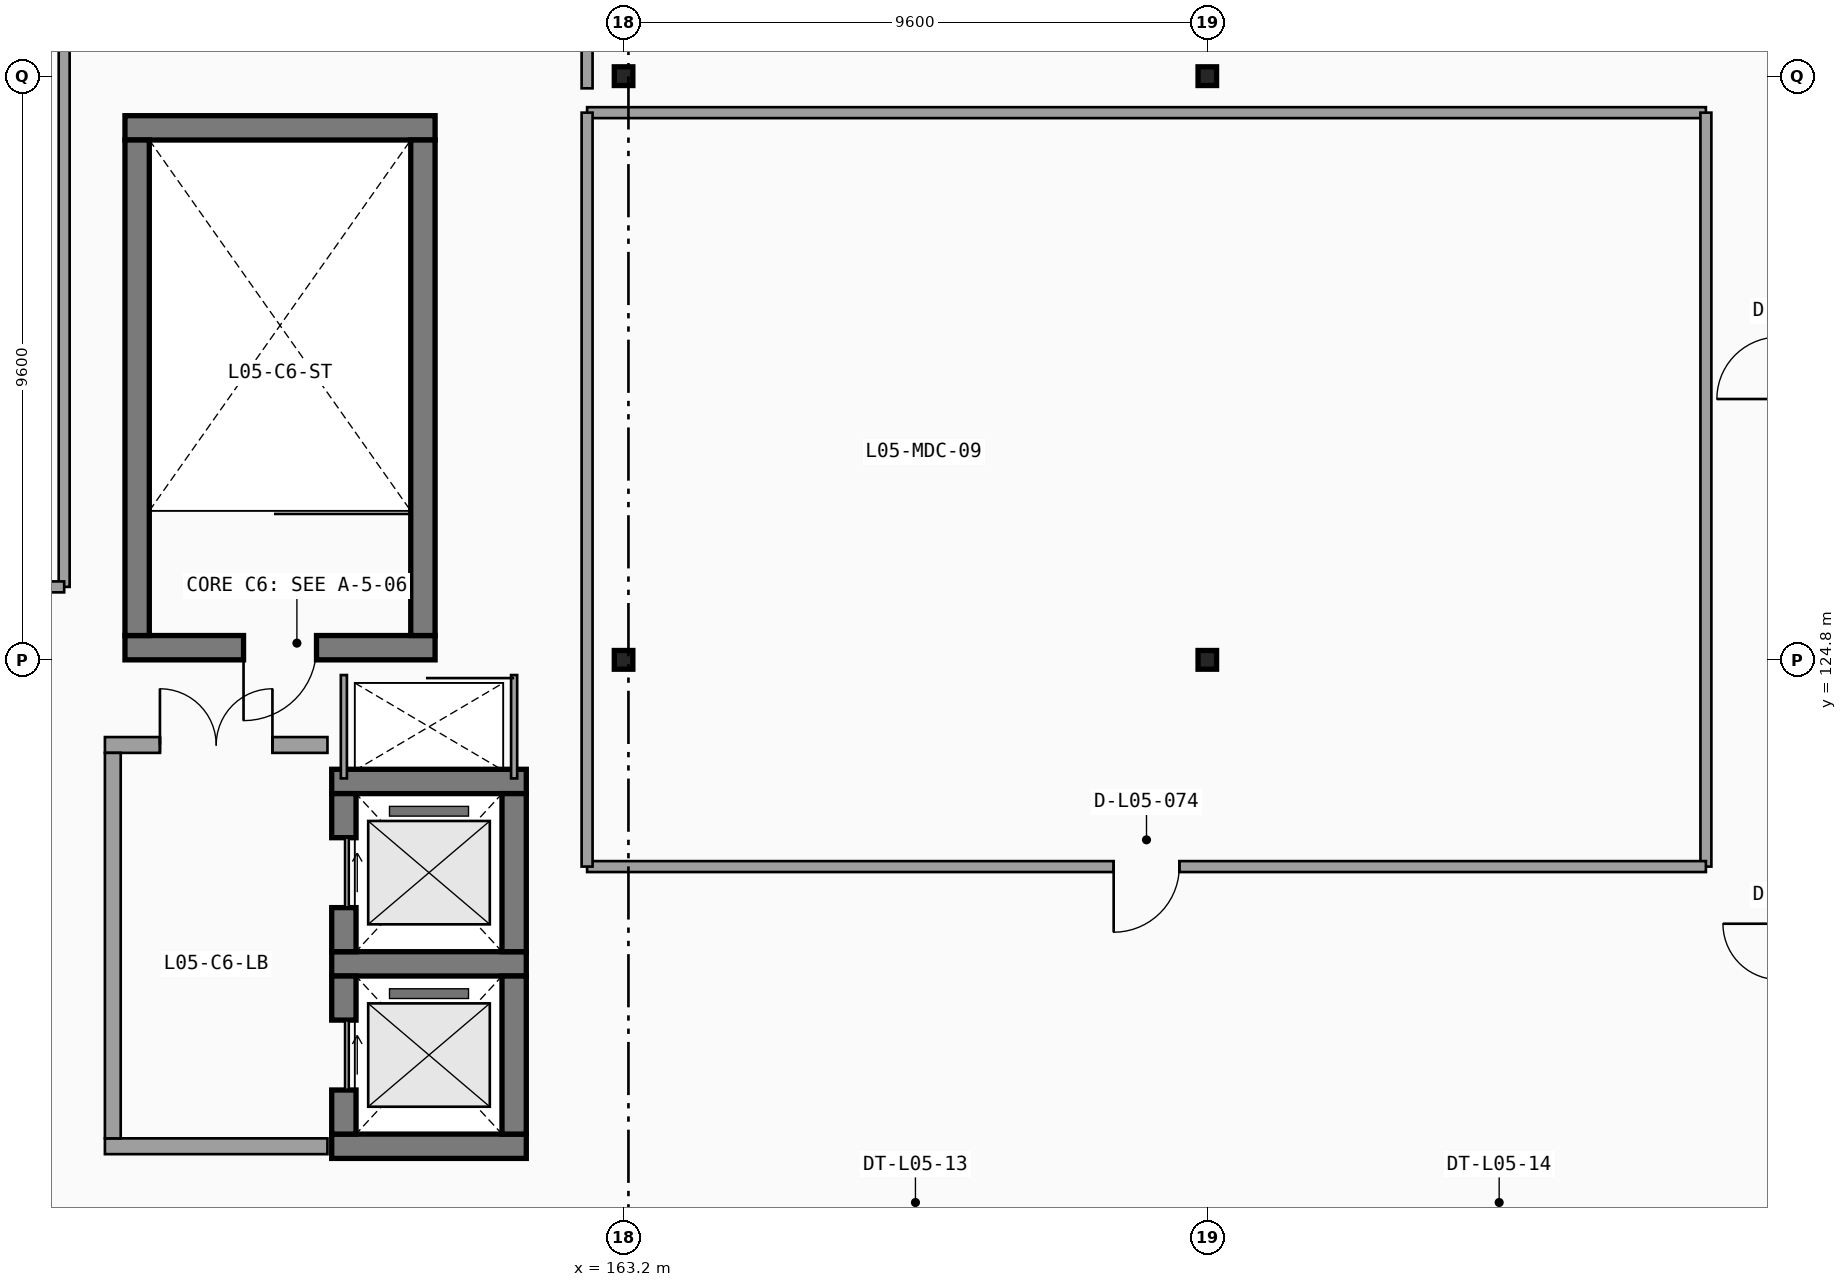
"""IFC4 building model, lengths in metres.
Left out: names, types, materials, properties, quantities, classifications, styles, units other than length and angle.
Written with IfcOpenShell. Run it as: python <this file> out.ifc"""

import sys

from ifc_helpers import new_model, si_unit, direction, frame, frame_2d, origin, origin_2d, place, context, subcontext, project, spatial, rectangle, i_section, extrude, element, fill, save


model = new_model("IFC4")
c1 = context("Model", 3, precision=1e-05, world=origin(), true_north=direction((0.0, 1.0)))
c2 = subcontext(c1, "Body", "Model", "MODEL_VIEW")
j1 = project(units=[si_unit("LENGTHUNIT", "METRE"), si_unit("PLANEANGLEUNIT", "RADIAN")], contexts=[c1])
p1 = place(None, origin())
s1 = spatial("IfcSite", under=j1, at=p1, CompositionType="ELEMENT")
p2 = place(p1, origin())
s2 = spatial("IfcBuilding", under=s1, at=p2, CompositionType="ELEMENT")
p3 = place(p2, frame((0.0, 0.0, 23.1)))
s3 = spatial("IfcBuildingStorey", under=s2, at=p3, CompositionType="ELEMENT", Elevation=23.1)
for number, where, z_axis, x_axis in (
    (1, (163.2, 124.8, 0.0), (0.0, 0.0, 1.0), (1.0, 0.0, 0.0)),
    (2, (163.2, 134.4, 0.0), (0.0, 0.0, 1.0), (1.0, 0.0, 0.0)),
    (3, (172.8, 124.8, 0.0), (0.0, 0.0, 1.0), (1.0, 0.0, 0.0)),
    (4, (172.8, 134.4, 0.0), (0.0, 0.0, 1.0), (1.0, 0.0, 0.0)),
):
    element("IfcColumn", number, at=place(p3, frame(where, z_axis=z_axis, x_axis=x_axis)), inside=s3, PredefinedType="COLUMN", context=c2, shape_type="SweptSolid", body=[
        extrude(i_section(OverallWidth=0.305, OverallDepth=0.308, WebThickness=0.01, FlangeThickness=0.015, FilletRadius=0.013, at=origin_2d()), origin(), (0.0, 0.0, 1.0), 5.1),
    ])
p4 = place(p3, frame((155.0, 125.0, 0.0), z_axis=(0.0, 0.0, 1.0), x_axis=(1.0, 0.0, 0.0)))
e5 = element("IfcWall", 5, at=p4, inside=s3, PredefinedType="SHEAR", context=c2, shape_type="SweptSolid", body=[
    extrude(rectangle(XDim=5.1, YDim=0.4, at=frame_2d((2.55, 0.0))), origin(), (0.0, 0.0, 1.0), 4.82),
])
p5 = place(p4, frame((3.15, 0.0, 0.0), z_axis=(0.0, 0.0, 1.0), x_axis=(-1.0, 0.0, 0.0)))
e6 = element("IfcOpeningElement", 6, at=p5, cuts=e5, PredefinedType="OPENING", context=c2, shape_type="SweptSolid", body=[
    extrude(rectangle(XDim=1.2, YDim=2.2, at=frame_2d((0.6, 1.1))), frame((0.0, 0.21, 0.0), z_axis=(0.0, -1.0, 0.0), x_axis=(1.0, 0.0, 0.0)), (0.0, 0.0, 1.0), 0.42),
])
p6 = place(p3, frame((160.1, 133.55, 0.0), z_axis=(0.0, 0.0, 1.0), x_axis=(-1.0, 0.0, 0.0)))
e7 = element("IfcWall", 7, at=p6, inside=s3, PredefinedType="SHEAR", context=c2, shape_type="SweptSolid", body=[
    extrude(rectangle(XDim=5.1, YDim=0.4, at=frame_2d((2.55, 0.0))), origin(), (0.0, 0.0, 1.0), 4.82),
])
for number, where, z_axis, x_axis in (
    (8, (155.2, 133.35, 0.0), (0.0, 0.0, 1.0), (0.0, -1.0, 0.0)),
    (9, (159.9, 125.2, 0.0), (0.0, 0.0, 1.0), (0.0, 1.0, 0.0)),
):
    element("IfcWall", number, at=place(p3, frame(where, z_axis=z_axis, x_axis=x_axis)), inside=s3, PredefinedType="SHEAR", context=c2, shape_type="SweptSolid", body=[
        extrude(rectangle(XDim=8.15, YDim=0.4, at=frame_2d((4.075, 0.0))), origin(), (0.0, 0.0, 1.0), 4.82),
    ])
for number, where, z_axis, x_axis in (
    (10, (158.4, 116.8, 0.0), (0.0, 0.0, 1.0), (1.0, 0.0, 0.0)),
    (11, (161.6, 119.8, 0.0), (0.0, 0.0, 1.0), (-1.0, 0.0, 0.0)),
):
    element("IfcWall", number, at=place(p3, frame(where, z_axis=z_axis, x_axis=x_axis)), inside=s3, PredefinedType="SHEAR", context=c2, shape_type="SweptSolid", body=[
        extrude(rectangle(XDim=3.2, YDim=0.4, at=frame_2d((1.6, 0.0))), origin(), (0.0, 0.0, 1.0), 4.82),
    ])
p7 = place(p3, frame((158.6, 119.6, 0.0), z_axis=(0.0, 0.0, 1.0), x_axis=(0.0, -1.0, 0.0)))
e12 = element("IfcWall", 12, at=p7, inside=s3, PredefinedType="SHEAR", context=c2, shape_type="SweptSolid", body=[
    extrude(rectangle(XDim=2.6, YDim=0.4, at=frame_2d((1.3, 0.0))), origin(), (0.0, 0.0, 1.0), 4.82),
])
p8 = place(p7, frame((0.725, 0.0, 0.0), z_axis=(0.0, 0.0, 1.0), x_axis=(1.0, 0.0, 0.0)))
e13 = element("IfcOpeningElement", 13, at=p8, cuts=e12, PredefinedType="OPENING", context=c2, shape_type="SweptSolid", body=[
    extrude(rectangle(XDim=1.15, YDim=2.2, at=frame_2d((0.575, 1.1))), frame((0.0, 0.21, 0.0), z_axis=(0.0, -1.0, 0.0), x_axis=(1.0, 0.0, 0.0)), (0.0, 0.0, 1.0), 0.42),
])
p9 = place(p3, frame((161.4, 117.0, 0.0), z_axis=(0.0, 0.0, 1.0), x_axis=(0.0, 1.0, 0.0)))
e14 = element("IfcWall", 14, at=p9, inside=s3, PredefinedType="SHEAR", context=c2, shape_type="SweptSolid", body=[
    extrude(rectangle(XDim=2.6, YDim=0.4, at=frame_2d((1.3, 0.0))), origin(), (0.0, 0.0, 1.0), 4.82),
])
p10 = place(p3, frame((161.6, 122.8, 0.0), z_axis=(0.0, 0.0, 1.0), x_axis=(-1.0, 0.0, 0.0)))
e15 = element("IfcWall", 15, at=p10, inside=s3, PredefinedType="SHEAR", context=c2, shape_type="SweptSolid", body=[
    extrude(rectangle(XDim=3.2, YDim=0.4, at=frame_2d((1.6, 0.0))), origin(), (0.0, 0.0, 1.0), 4.82),
])
p11 = place(p3, frame((158.6, 122.6, 0.0), z_axis=(0.0, 0.0, 1.0), x_axis=(0.0, -1.0, 0.0)))
e16 = element("IfcWall", 16, at=p11, inside=s3, PredefinedType="SHEAR", context=c2, shape_type="SweptSolid", body=[
    extrude(rectangle(XDim=2.6, YDim=0.4, at=frame_2d((1.3, 0.0))), origin(), (0.0, 0.0, 1.0), 4.82),
])
p12 = place(p11, frame((0.725, 0.0, 0.0), z_axis=(0.0, 0.0, 1.0), x_axis=(1.0, 0.0, 0.0)))
e17 = element("IfcOpeningElement", 17, at=p12, cuts=e16, PredefinedType="OPENING", context=c2, shape_type="SweptSolid", body=[
    extrude(rectangle(XDim=1.15, YDim=2.2, at=frame_2d((0.575, 1.1))), frame((0.0, 0.21, 0.0), z_axis=(0.0, -1.0, 0.0), x_axis=(1.0, 0.0, 0.0)), (0.0, 0.0, 1.0), 0.42),
])
p13 = place(p3, frame((161.4, 120.0, 0.0), z_axis=(0.0, 0.0, 1.0), x_axis=(0.0, 1.0, 0.0)))
e18 = element("IfcWall", 18, at=p13, inside=s3, PredefinedType="SHEAR", context=c2, shape_type="SweptSolid", body=[
    extrude(rectangle(XDim=2.6, YDim=0.4, at=frame_2d((1.3, 0.0))), origin(), (0.0, 0.0, 1.0), 4.82),
])
for number, where, z_axis, x_axis in (
    (19, (158.6, 124.55, 0.0), (0.0, 0.0, 1.0), (0.0, -1.0, 0.0)),
    (20, (161.4, 122.85, 0.0), (0.0, 0.0, 1.0), (0.0, 1.0, 0.0)),
):
    element("IfcWall", number, at=place(p3, frame(where, z_axis=z_axis, x_axis=x_axis)), inside=s3, PredefinedType="PARTITIONING", context=c2, shape_type="SweptSolid", body=[
        extrude(rectangle(XDim=1.7, YDim=0.1, at=frame_2d((0.85, 0.0))), origin(), (0.0, 0.0, 1.0), 4.82),
    ])
p14 = place(p3, frame((154.67, 116.8, 0.0), z_axis=(0.0, 0.0, 1.0), x_axis=(1.0, 0.0, 0.0)))
e21 = element("IfcWall", 21, at=p14, inside=s3, PredefinedType="SOLIDWALL", context=c2, shape_type="SweptSolid", body=[
    extrude(rectangle(XDim=3.66, YDim=0.26, at=frame_2d((1.83, 0.0))), origin(), (0.0, 0.0, 1.0), 4.82),
])
p15 = place(p3, frame((158.33, 123.4, 0.0), z_axis=(0.0, 0.0, 1.0), x_axis=(-1.0, 0.0, 0.0)))
e22 = element("IfcWall", 22, at=p15, inside=s3, PredefinedType="SOLIDWALL", context=c2, shape_type="SweptSolid", body=[
    extrude(rectangle(XDim=3.66, YDim=0.26, at=frame_2d((1.83, 0.0))), origin(), (0.0, 0.0, 1.0), 4.82),
])
p16 = place(p15, frame((2.755, 0.0, 0.0), z_axis=(0.0, 0.0, 1.0), x_axis=(-1.0, 0.0, 0.0)))
e23 = element("IfcOpeningElement", 23, at=p16, cuts=e22, PredefinedType="OPENING", context=c2, shape_type="SweptSolid", body=[
    extrude(rectangle(XDim=1.85, YDim=2.25, at=frame_2d((0.925, 1.125))), frame((0.0, 0.14, 0.0), z_axis=(0.0, -1.0, 0.0), x_axis=(1.0, 0.0, 0.0)), (0.0, 0.0, 1.0), 0.28),
])
p17 = place(p3, frame((154.8, 123.27, 0.0), z_axis=(0.0, 0.0, 1.0), x_axis=(0.0, -1.0, 0.0)))
e24 = element("IfcWall", 24, at=p17, inside=s3, PredefinedType="SOLIDWALL", context=c2, shape_type="SweptSolid", body=[
    extrude(rectangle(XDim=6.34, YDim=0.26, at=frame_2d((3.17, 0.0))), origin(), (0.0, 0.0, 1.0), 4.82),
])
p18 = place(p3, frame((154.0, 143.6, 0.0), z_axis=(0.0, 0.0, 1.0), x_axis=(0.0, -1.0, 0.0)))
e25 = element("IfcWall", 25, at=p18, inside=s3, PredefinedType="PARTITIONING", context=c2, shape_type="SweptSolid", body=[
    extrude(rectangle(XDim=17.6, YDim=0.18, at=frame_2d((8.8, 0.0))), origin(), (0.0, 0.0, 1.0), 3.906),
])
p19 = place(p3, frame((154.0, 126.0, 0.0), z_axis=(0.0, 0.0, 1.0), x_axis=(-1.0, 0.0, 0.0)))
e26 = element("IfcWall", 26, at=p19, inside=s3, PredefinedType="PARTITIONING", context=c2, shape_type="SweptSolid", body=[
    extrude(rectangle(XDim=9.6, YDim=0.18, at=frame_2d((4.8, 0.0))), origin(), (0.0, 0.0, 1.0), 3.906),
])
p20 = place(p19, frame((4.66, 0.0, 0.0), z_axis=(0.0, 0.0, 1.0), x_axis=(1.0, 0.0, 0.0)))
e27 = element("IfcOpeningElement", 27, at=p20, cuts=e26, PredefinedType="OPENING", context=c2, shape_type="SweptSolid", body=[
    extrude(rectangle(XDim=1.08, YDim=2.22, at=frame_2d((0.54, 1.11))), frame((0.0, 0.1, 0.0), z_axis=(0.0, -1.0, 0.0), x_axis=(1.0, 0.0, 0.0)), (0.0, 0.0, 1.0), 0.2),
])
p21 = place(p3, frame((162.6, 133.8, 0.0), z_axis=(0.0, 0.0, 1.0), x_axis=(1.0, 0.0, 0.0)))
e28 = element("IfcWall", 28, at=p21, inside=s3, PredefinedType="PARTITIONING", context=c2, shape_type="SweptSolid", body=[
    extrude(rectangle(XDim=18.4, YDim=0.18, at=frame_2d((9.2, 0.0))), origin(), (0.0, 0.0, 1.0), 3.893),
])
p22 = place(p3, frame((181.0, 133.8, 0.0), z_axis=(0.0, 0.0, 1.0), x_axis=(0.0, -1.0, 0.0)))
e29 = element("IfcWall", 29, at=p22, inside=s3, PredefinedType="PARTITIONING", context=c2, shape_type="SweptSolid", body=[
    extrude(rectangle(XDim=12.4, YDim=0.18, at=frame_2d((6.2, 0.0))), origin(), (0.0, 0.0, 1.0), 3.906),
])
p23 = place(p3, frame((181.0, 121.4, 0.0), z_axis=(0.0, 0.0, 1.0), x_axis=(-1.0, 0.0, 0.0)))
e30 = element("IfcWall", 30, at=p23, inside=s3, PredefinedType="PARTITIONING", context=c2, shape_type="SweptSolid", body=[
    extrude(rectangle(XDim=18.4, YDim=0.18, at=frame_2d((9.2, 0.0))), origin(), (0.0, 0.0, 1.0), 3.893),
])
p24 = place(p23, frame((8.66, 0.0, 0.0), z_axis=(0.0, 0.0, 1.0), x_axis=(1.0, 0.0, 0.0)))
e31 = element("IfcOpeningElement", 31, at=p24, cuts=e30, PredefinedType="OPENING", context=c2, shape_type="SweptSolid", body=[
    extrude(rectangle(XDim=1.08, YDim=2.22, at=frame_2d((0.54, 1.11))), frame((0.0, 0.1, 0.0), z_axis=(0.0, -1.0, 0.0), x_axis=(1.0, 0.0, 0.0)), (0.0, 0.0, 1.0), 0.2),
])
p25 = place(p3, frame((162.6, 121.4, 0.0), z_axis=(0.0, 0.0, 1.0), x_axis=(0.0, 1.0, 0.0)))
e32 = element("IfcWall", 32, at=p25, inside=s3, PredefinedType="PARTITIONING", context=c2, shape_type="SweptSolid", body=[
    extrude(rectangle(XDim=12.4, YDim=0.18, at=frame_2d((6.2, 0.0))), origin(), (0.0, 0.0, 1.0), 3.906),
])
p26 = place(p3, frame((162.6, 134.2, 0.0), z_axis=(0.0, 0.0, 1.0), x_axis=(0.0, 1.0, 0.0)))
e33 = element("IfcWall", 33, at=p26, inside=s3, PredefinedType="PARTITIONING", context=c2, shape_type="SweptSolid", body=[
    extrude(rectangle(XDim=9.4, YDim=0.18, at=frame_2d((4.7, 0.0))), origin(), (0.0, 0.0, 1.0), 3.906),
])
p27 = place(p26, frame((4.46, 0.0, 0.0), z_axis=(0.0, 0.0, 1.0), x_axis=(1.0, 0.0, 0.0)))
e34 = element("IfcOpeningElement", 34, at=p27, cuts=e33, PredefinedType="OPENING", context=c2, shape_type="SweptSolid", body=[
    extrude(rectangle(XDim=1.08, YDim=2.22, at=frame_2d((0.54, 1.11))), frame((0.0, 0.1, 0.0), z_axis=(0.0, -1.0, 0.0), x_axis=(1.0, 0.0, 0.0)), (0.0, 0.0, 1.0), 0.2),
])
p28 = place(p5, origin())
e35 = element("IfcDoor", 35, at=p28, inside=s3, OperationType="SINGLE_SWING_RIGHT", PredefinedType="DOOR", context=c2, shape_type="SweptSolid", body=[
    extrude(rectangle(XDim=1.2, YDim=2.2, at=frame_2d((0.6, 1.1))), frame((0.0, 0.025, 0.0), z_axis=(0.0, -1.0, 0.0), x_axis=(1.0, 0.0, 0.0)), (0.0, 0.0, 1.0), 0.05),
])
fill(e6, e35)
p29 = place(p8, origin())
e36 = element("IfcDoor", 36, at=p29, inside=s3, OperationType="SLIDING_TO_LEFT", PredefinedType="DOOR", context=c2, shape_type="SweptSolid", body=[
    extrude(rectangle(XDim=1.15, YDim=2.2, at=frame_2d((0.575, 1.1))), frame((0.0, 0.025, 0.0), z_axis=(0.0, -1.0, 0.0), x_axis=(1.0, 0.0, 0.0)), (0.0, 0.0, 1.0), 0.05),
])
fill(e13, e36)
p30 = place(p12, origin())
e37 = element("IfcDoor", 37, at=p30, inside=s3, OperationType="SLIDING_TO_LEFT", PredefinedType="DOOR", context=c2, shape_type="SweptSolid", body=[
    extrude(rectangle(XDim=1.15, YDim=2.2, at=frame_2d((0.575, 1.1))), frame((0.0, 0.025, 0.0), z_axis=(0.0, -1.0, 0.0), x_axis=(1.0, 0.0, 0.0)), (0.0, 0.0, 1.0), 0.05),
])
fill(e17, e37)
p31 = place(p16, origin())
e38 = element("IfcDoor", 38, at=p31, inside=s3, OperationType="DOUBLE_DOOR_SINGLE_SWING", PredefinedType="DOOR", context=c2, shape_type="SweptSolid", body=[
    extrude(rectangle(XDim=1.85, YDim=2.25, at=frame_2d((0.925, 1.125))), frame((0.0, 0.025, 0.0), z_axis=(0.0, -1.0, 0.0), x_axis=(1.0, 0.0, 0.0)), (0.0, 0.0, 1.0), 0.05),
])
fill(e23, e38)
p32 = place(p24, origin())
e39 = element("IfcDoor", 39, at=p32, inside=s3, OperationType="SINGLE_SWING_RIGHT", PredefinedType="DOOR", context=c2, shape_type="SweptSolid", body=[
    extrude(rectangle(XDim=1.08, YDim=2.22, at=frame_2d((0.54, 1.11))), frame((0.0, 0.025, 0.0), z_axis=(0.0, -1.0, 0.0), x_axis=(1.0, 0.0, 0.0)), (0.0, 0.0, 1.0), 0.05),
])
fill(e31, e39)
save(model, sys.argv[1])
